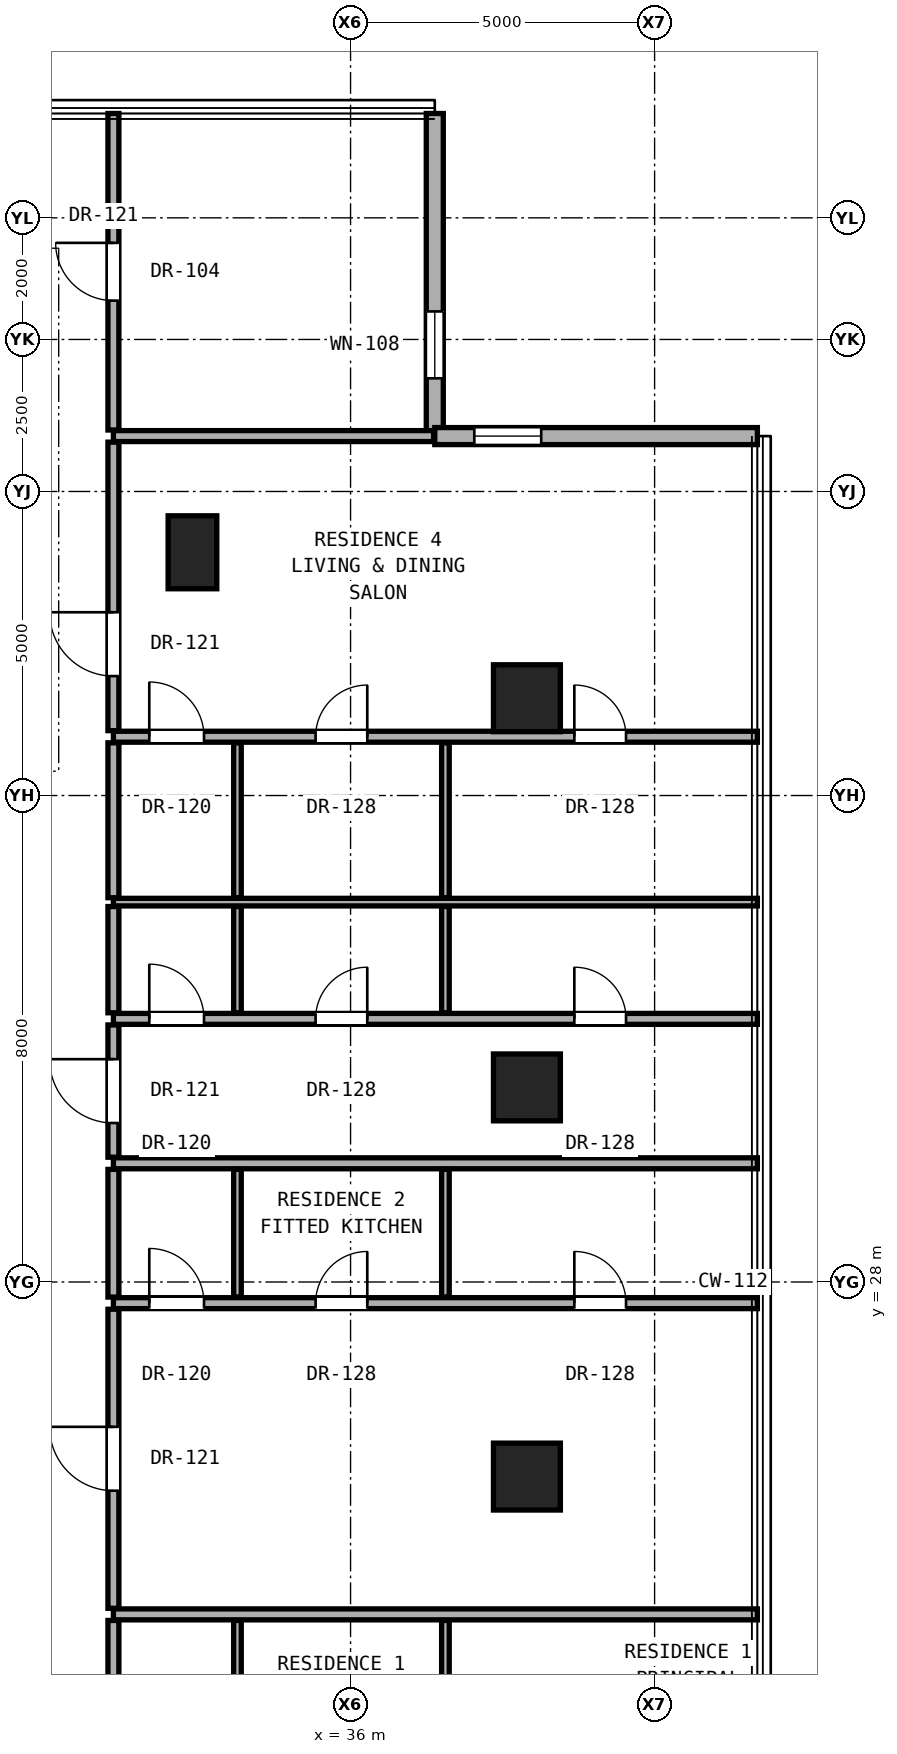
"""IFC4 building model, lengths in metres.
Left out: names, types, materials, properties, quantities, classifications, styles, units other than length and angle.
Written with IfcOpenShell. Run it as: python <this file> out.ifc"""

import sys

from ifc_helpers import new_model, si_unit, direction, frame, frame_2d, origin, origin_2d, place, context, subcontext, project, spatial, rectangle, hollow_rectangle, extrude, element, fill, save


model = new_model("IFC4")
c1 = context("Model", 3, precision=1e-05, world=origin(), true_north=direction((0.0, 1.0)))
c2 = subcontext(c1, "Body", "Model", "MODEL_VIEW")
j1 = project(units=[si_unit("LENGTHUNIT", "METRE"), si_unit("PLANEANGLEUNIT", "RADIAN")], contexts=[c1])
p1 = place(None, origin())
s1 = spatial("IfcSite", under=j1, at=p1, CompositionType="ELEMENT")
p2 = place(p1, origin())
s2 = spatial("IfcBuilding", under=s1, at=p2, CompositionType="ELEMENT")
p3 = place(p2, frame((0.0, 0.0, 111.5)))
s3 = spatial("IfcBuildingStorey", under=s2, at=p3, CompositionType="ELEMENT", Elevation=111.5)
for number, where, z_axis, x_axis in (
    (1, (38.9, 24.8, 0.0), (0.0, 0.0, 1.0), (1.0, 0.0, 0.0)),
    (2, (38.9, 31.2, 0.0), (0.0, 0.0, 1.0), (1.0, 0.0, 0.0)),
    (3, (38.9, 37.6, 0.0), (0.0, 0.0, 1.0), (1.0, 0.0, 0.0)),
):
    element("IfcColumn", number, at=place(p3, frame(where, z_axis=z_axis, x_axis=x_axis)), inside=s3, PredefinedType="COLUMN", context=c2, shape_type="SweptSolid", body=[
        extrude(hollow_rectangle(XDim=1.1, YDim=1.1, WallThickness=0.06, at=origin_2d()), origin(), (0.0, 0.0, 1.0), 3.3),
    ])
p4 = place(p3, frame((33.4, 40.0, 0.0), z_axis=(0.0, 0.0, 1.0), x_axis=(1.0, 0.0, 0.0)))
e4 = element("IfcColumn", 4, at=p4, inside=s3, PredefinedType="PILASTER", context=c2, shape_type="SweptSolid", body=[
    extrude(rectangle(XDim=0.8, YDim=1.2, at=origin_2d()), origin(), (0.0, 0.0, 1.0), 3.3),
])
p5 = place(p3, frame((37.385, 41.911, 0.0), z_axis=(0.0, 0.0, 1.0), x_axis=(0.0, 1.0, 0.0)))
e5 = element("IfcWall", 5, at=p5, inside=s3, PredefinedType="SOLIDWALL", context=c2, shape_type="SweptSolid", body=[
    extrude(rectangle(XDim=5.305, YDim=0.28, at=frame_2d((2.653, 0.0))), origin(), (0.0, 0.0, 1.0), 3.06),
])
p6 = place(p5, frame((0.95, 0.0, 0.85)))
e6 = element("IfcOpeningElement", 6, at=p6, cuts=e5, PredefinedType="OPENING", context=c2, shape_type="SweptSolid", body=[
    extrude(rectangle(XDim=1.1, YDim=2.0, at=frame_2d((0.55, 1.0))), frame((0.0, 0.15, 0.0), z_axis=(0.0, -1.0, 0.0), x_axis=(1.0, 0.0, 0.0)), (0.0, 0.0, 1.0), 0.3),
])
p7 = place(p3, frame((42.69, 41.911, 0.0), z_axis=(0.0, 0.0, 1.0), x_axis=(-1.0, 0.0, 0.0)))
e7 = element("IfcWall", 7, at=p7, inside=s3, PredefinedType="SOLIDWALL", context=c2, shape_type="SweptSolid", body=[
    extrude(rectangle(XDim=5.305, YDim=0.28, at=frame_2d((2.652, 0.0))), origin(), (0.0, 0.0, 1.0), 3.06),
])
p8 = place(p7, frame((3.555, 0.0, 0.85)))
e8 = element("IfcOpeningElement", 8, at=p8, cuts=e7, PredefinedType="OPENING", context=c2, shape_type="SweptSolid", body=[
    extrude(rectangle(XDim=1.1, YDim=2.0, at=frame_2d((0.55, 1.0))), frame((0.0, 0.15, 0.0), z_axis=(0.0, -1.0, 0.0), x_axis=(1.0, 0.0, 0.0)), (0.0, 0.0, 1.0), 0.3),
])
p9 = place(p3, frame((32.1, 22.534, 0.0), z_axis=(0.0, 0.0, 1.0), x_axis=(1.0, 0.0, 0.0)))
e9 = element("IfcWall", 9, at=p9, inside=s3, PredefinedType="PARTITIONING", context=c2, shape_type="SweptSolid", body=[
    extrude(rectangle(XDim=10.59, YDim=0.18, at=frame_2d((5.295, 0.0))), origin(), (0.0, 0.0, 1.0), 2.145),
])
p10 = place(p3, frame((32.1, 27.652, 0.0), z_axis=(0.0, 0.0, 1.0), x_axis=(1.0, 0.0, 0.0)))
e10 = element("IfcWall", 10, at=p10, inside=s3, PredefinedType="PARTITIONING", context=c2, shape_type="SweptSolid", body=[
    extrude(rectangle(XDim=10.59, YDim=0.18, at=frame_2d((5.295, 0.0))), origin(), (0.0, 0.0, 1.0), 2.145),
])
p11 = place(p10, frame((7.58, 0.0, 0.0)))
e11 = element("IfcOpeningElement", 11, at=p11, cuts=e10, PredefinedType="OPENING", context=c2, shape_type="SweptSolid", body=[
    extrude(rectangle(XDim=0.85, YDim=2.01, at=frame_2d((0.425, 1.005))), frame((0.0, 0.1, 0.0), z_axis=(0.0, -1.0, 0.0), x_axis=(1.0, 0.0, 0.0)), (0.0, 0.0, 1.0), 0.2),
])
p12 = place(p10, frame((3.325, 0.0, 0.0)))
e12 = element("IfcOpeningElement", 12, at=p12, cuts=e10, PredefinedType="OPENING", context=c2, shape_type="SweptSolid", body=[
    extrude(rectangle(XDim=0.85, YDim=2.01, at=frame_2d((0.425, 1.005))), frame((0.0, 0.1, 0.0), z_axis=(0.0, -1.0, 0.0), x_axis=(1.0, 0.0, 0.0)), (0.0, 0.0, 1.0), 0.2),
])
p13 = place(p10, frame((0.59, 0.0, 0.0)))
e13 = element("IfcOpeningElement", 13, at=p13, cuts=e10, PredefinedType="OPENING", context=c2, shape_type="SweptSolid", body=[
    extrude(rectangle(XDim=0.9, YDim=2.1, at=frame_2d((0.45, 1.05))), frame((0.0, 0.1, 0.0), z_axis=(0.0, -1.0, 0.0), x_axis=(1.0, 0.0, 0.0)), (0.0, 0.0, 1.0), 0.2),
])
p14 = place(p3, frame((32.1, 29.952, 0.0), z_axis=(0.0, 0.0, 1.0), x_axis=(1.0, 0.0, 0.0)))
e14 = element("IfcWall", 14, at=p14, inside=s3, PredefinedType="PARTITIONING", context=c2, shape_type="SweptSolid", body=[
    extrude(rectangle(XDim=10.59, YDim=0.18, at=frame_2d((5.295, 0.0))), origin(), (0.0, 0.0, 1.0), 2.145),
])
p15 = place(p3, frame((32.1, 32.327, 0.0), z_axis=(0.0, 0.0, 1.0), x_axis=(1.0, 0.0, 0.0)))
e15 = element("IfcWall", 15, at=p15, inside=s3, PredefinedType="PARTITIONING", context=c2, shape_type="SweptSolid", body=[
    extrude(rectangle(XDim=10.59, YDim=0.18, at=frame_2d((5.295, 0.0))), origin(), (0.0, 0.0, 1.0), 2.145),
])
p16 = place(p15, frame((7.58, 0.0, 0.0)))
e16 = element("IfcOpeningElement", 16, at=p16, cuts=e15, PredefinedType="OPENING", context=c2, shape_type="SweptSolid", body=[
    extrude(rectangle(XDim=0.85, YDim=2.01, at=frame_2d((0.425, 1.005))), frame((0.0, 0.1, 0.0), z_axis=(0.0, -1.0, 0.0), x_axis=(1.0, 0.0, 0.0)), (0.0, 0.0, 1.0), 0.2),
])
p17 = place(p15, frame((3.325, 0.0, 0.0)))
e17 = element("IfcOpeningElement", 17, at=p17, cuts=e15, PredefinedType="OPENING", context=c2, shape_type="SweptSolid", body=[
    extrude(rectangle(XDim=0.85, YDim=2.01, at=frame_2d((0.425, 1.005))), frame((0.0, 0.1, 0.0), z_axis=(0.0, -1.0, 0.0), x_axis=(1.0, 0.0, 0.0)), (0.0, 0.0, 1.0), 0.2),
])
p18 = place(p15, frame((0.59, 0.0, 0.0)))
e18 = element("IfcOpeningElement", 18, at=p18, cuts=e15, PredefinedType="OPENING", context=c2, shape_type="SweptSolid", body=[
    extrude(rectangle(XDim=0.9, YDim=2.1, at=frame_2d((0.45, 1.05))), frame((0.0, 0.1, 0.0), z_axis=(0.0, -1.0, 0.0), x_axis=(1.0, 0.0, 0.0)), (0.0, 0.0, 1.0), 0.2),
])
p19 = place(p3, frame((32.1, 34.247, 0.0), z_axis=(0.0, 0.0, 1.0), x_axis=(1.0, 0.0, 0.0)))
e19 = element("IfcWall", 19, at=p19, inside=s3, PredefinedType="PARTITIONING", context=c2, shape_type="SweptSolid", body=[
    extrude(rectangle(XDim=10.59, YDim=0.125, at=frame_2d((5.295, 0.0))), origin(), (0.0, 0.0, 1.0), 2.145),
])
p20 = place(p3, frame((32.1, 36.967, 0.0), z_axis=(0.0, 0.0, 1.0), x_axis=(1.0, 0.0, 0.0)))
e20 = element("IfcWall", 20, at=p20, inside=s3, PredefinedType="PARTITIONING", context=c2, shape_type="SweptSolid", body=[
    extrude(rectangle(XDim=10.59, YDim=0.18, at=frame_2d((5.295, 0.0))), origin(), (0.0, 0.0, 1.0), 2.145),
])
p21 = place(p20, frame((7.58, 0.0, 0.0)))
e21 = element("IfcOpeningElement", 21, at=p21, cuts=e20, PredefinedType="OPENING", context=c2, shape_type="SweptSolid", body=[
    extrude(rectangle(XDim=0.85, YDim=2.01, at=frame_2d((0.425, 1.005))), frame((0.0, 0.1, 0.0), z_axis=(0.0, -1.0, 0.0), x_axis=(1.0, 0.0, 0.0)), (0.0, 0.0, 1.0), 0.2),
])
p22 = place(p20, frame((3.325, 0.0, 0.0)))
e22 = element("IfcOpeningElement", 22, at=p22, cuts=e20, PredefinedType="OPENING", context=c2, shape_type="SweptSolid", body=[
    extrude(rectangle(XDim=0.85, YDim=2.01, at=frame_2d((0.425, 1.005))), frame((0.0, 0.1, 0.0), z_axis=(0.0, -1.0, 0.0), x_axis=(1.0, 0.0, 0.0)), (0.0, 0.0, 1.0), 0.2),
])
p23 = place(p20, frame((0.59, 0.0, 0.0)))
e23 = element("IfcOpeningElement", 23, at=p23, cuts=e20, PredefinedType="OPENING", context=c2, shape_type="SweptSolid", body=[
    extrude(rectangle(XDim=0.9, YDim=2.1, at=frame_2d((0.45, 1.05))), frame((0.0, 0.1, 0.0), z_axis=(0.0, -1.0, 0.0), x_axis=(1.0, 0.0, 0.0)), (0.0, 0.0, 1.0), 0.2),
])
p24 = place(p3, frame((32.1, 41.911, 0.0), z_axis=(0.0, 0.0, 1.0), x_axis=(1.0, 0.0, 0.0)))
e24 = element("IfcWall", 24, at=p24, inside=s3, PredefinedType="PARTITIONING", context=c2, shape_type="SweptSolid", body=[
    extrude(rectangle(XDim=5.265, YDim=0.18, at=frame_2d((2.632, 0.0))), origin(), (0.0, 0.0, 1.0), 3.08),
])
p25 = place(p3, frame((32.1, 19.914, 0.0), z_axis=(0.0, 0.0, 1.0), x_axis=(0.0, 1.0, 0.0)))
e25 = element("IfcWall", 25, at=p25, inside=s3, PredefinedType="PARTITIONING", context=c2, shape_type="SweptSolid", body=[
    extrude(rectangle(XDim=2.52, YDim=0.18, at=frame_2d((1.26, 0.0))), origin(), (0.0, 0.0, 1.0), 3.08),
])
p26 = place(p3, frame((32.1, 22.634, 0.0), z_axis=(0.0, 0.0, 1.0), x_axis=(0.0, 1.0, 0.0)))
e26 = element("IfcWall", 26, at=p26, inside=s3, PredefinedType="PARTITIONING", context=c2, shape_type="SweptSolid", body=[
    extrude(rectangle(XDim=4.918, YDim=0.18, at=frame_2d((2.459, 0.0))), origin(), (0.0, 0.0, 1.0), 2.299),
])
p27 = place(p26, frame((1.934, 0.0, 0.0)))
e27 = element("IfcOpeningElement", 27, at=p27, cuts=e26, PredefinedType="OPENING", context=c2, shape_type="SweptSolid", body=[
    extrude(rectangle(XDim=1.05, YDim=2.2, at=frame_2d((0.525, 1.1))), frame((0.0, 0.1, 0.0), z_axis=(0.0, -1.0, 0.0), x_axis=(1.0, 0.0, 0.0)), (0.0, 0.0, 1.0), 0.2),
])
p28 = place(p3, frame((32.1, 27.752, 0.0), z_axis=(0.0, 0.0, 1.0), x_axis=(0.0, 1.0, 0.0)))
e28 = element("IfcWall", 28, at=p28, inside=s3, PredefinedType="PARTITIONING", context=c2, shape_type="SweptSolid", body=[
    extrude(rectangle(XDim=2.1, YDim=0.18, at=frame_2d((1.05, 0.0))), origin(), (0.0, 0.0, 1.0), 3.08),
])
p29 = place(p3, frame((32.1, 30.052, 0.0), z_axis=(0.0, 0.0, 1.0), x_axis=(0.0, 1.0, 0.0)))
e29 = element("IfcWall", 29, at=p29, inside=s3, PredefinedType="PARTITIONING", context=c2, shape_type="SweptSolid", body=[
    extrude(rectangle(XDim=2.175, YDim=0.18, at=frame_2d((1.087, 0.0))), origin(), (0.0, 0.0, 1.0), 2.299),
])
p30 = place(p29, frame((0.562, 0.0, 0.0)))
e30 = element("IfcOpeningElement", 30, at=p30, cuts=e29, PredefinedType="OPENING", context=c2, shape_type="SweptSolid", body=[
    extrude(rectangle(XDim=1.05, YDim=2.2, at=frame_2d((0.525, 1.1))), frame((0.0, 0.1, 0.0), z_axis=(0.0, -1.0, 0.0), x_axis=(1.0, 0.0, 0.0)), (0.0, 0.0, 1.0), 0.2),
])
p31 = place(p3, frame((32.1, 32.427, 0.0), z_axis=(0.0, 0.0, 1.0), x_axis=(0.0, 1.0, 0.0)))
e31 = element("IfcWall", 31, at=p31, inside=s3, PredefinedType="PARTITIONING", context=c2, shape_type="SweptSolid", body=[
    extrude(rectangle(XDim=1.748, YDim=0.18, at=frame_2d((0.874, 0.0))), origin(), (0.0, 0.0, 1.0), 3.08),
])
p32 = place(p3, frame((32.1, 34.32, 0.0), z_axis=(0.0, 0.0, 1.0), x_axis=(0.0, 1.0, 0.0)))
e32 = element("IfcWall", 32, at=p32, inside=s3, PredefinedType="PARTITIONING", context=c2, shape_type="SweptSolid", body=[
    extrude(rectangle(XDim=2.547, YDim=0.18, at=frame_2d((1.274, 0.0))), origin(), (0.0, 0.0, 1.0), 3.08),
])
p33 = place(p3, frame((32.1, 37.067, 0.0), z_axis=(0.0, 0.0, 1.0), x_axis=(0.0, 1.0, 0.0)))
e33 = element("IfcWall", 33, at=p33, inside=s3, PredefinedType="PARTITIONING", context=c2, shape_type="SweptSolid", body=[
    extrude(rectangle(XDim=4.744, YDim=0.18, at=frame_2d((2.372, 0.0))), origin(), (0.0, 0.0, 1.0), 2.456),
])
p34 = place(p33, frame((0.897, 0.0, 0.0)))
e34 = element("IfcOpeningElement", 34, at=p34, cuts=e33, PredefinedType="OPENING", context=c2, shape_type="SweptSolid", body=[
    extrude(rectangle(XDim=1.05, YDim=2.2, at=frame_2d((0.525, 1.1))), frame((0.0, 0.1, 0.0), z_axis=(0.0, -1.0, 0.0), x_axis=(1.0, 0.0, 0.0)), (0.0, 0.0, 1.0), 0.2),
])
p35 = place(p3, frame((32.1, 42.011, 0.0), z_axis=(0.0, 0.0, 1.0), x_axis=(0.0, 1.0, 0.0)))
e35 = element("IfcWall", 35, at=p35, inside=s3, PredefinedType="PARTITIONING", context=c2, shape_type="SweptSolid", body=[
    extrude(rectangle(XDim=5.205, YDim=0.18, at=frame_2d((2.603, 0.0))), origin(), (0.0, 0.0, 1.0), 3.08),
])
p36 = place(p35, frame((2.127, 0.0, 0.0)))
e36 = element("IfcOpeningElement", 36, at=p36, cuts=e35, PredefinedType="OPENING", context=c2, shape_type="SweptSolid", body=[
    extrude(rectangle(XDim=0.95, YDim=2.15, at=frame_2d((0.475, 1.075))), frame((0.0, 0.1, 0.0), z_axis=(0.0, -1.0, 0.0), x_axis=(1.0, 0.0, 0.0)), (0.0, 0.0, 1.0), 0.2),
])
p37 = place(p3, frame((34.14, 19.914, 0.0), z_axis=(0.0, 0.0, 1.0), x_axis=(0.0, 1.0, 0.0)))
e37 = element("IfcWall", 37, at=p37, inside=s3, PredefinedType="PARTITIONING", context=c2, shape_type="SweptSolid", body=[
    extrude(rectangle(XDim=2.52, YDim=0.125, at=frame_2d((1.26, 0.0))), origin(), (0.0, 0.0, 1.0), 3.08),
])
p38 = place(p3, frame((34.14, 27.752, 0.0), z_axis=(0.0, 0.0, 1.0), x_axis=(0.0, 1.0, 0.0)))
e38 = element("IfcWall", 38, at=p38, inside=s3, PredefinedType="PARTITIONING", context=c2, shape_type="SweptSolid", body=[
    extrude(rectangle(XDim=2.1, YDim=0.125, at=frame_2d((1.05, 0.0))), origin(), (0.0, 0.0, 1.0), 3.08),
])
p39 = place(p3, frame((34.14, 32.427, 0.0), z_axis=(0.0, 0.0, 1.0), x_axis=(0.0, 1.0, 0.0)))
e39 = element("IfcWall", 39, at=p39, inside=s3, PredefinedType="PARTITIONING", context=c2, shape_type="SweptSolid", body=[
    extrude(rectangle(XDim=1.748, YDim=0.125, at=frame_2d((0.874, 0.0))), origin(), (0.0, 0.0, 1.0), 3.08),
])
p40 = place(p3, frame((34.14, 34.32, 0.0), z_axis=(0.0, 0.0, 1.0), x_axis=(0.0, 1.0, 0.0)))
e40 = element("IfcWall", 40, at=p40, inside=s3, PredefinedType="PARTITIONING", context=c2, shape_type="SweptSolid", body=[
    extrude(rectangle(XDim=2.547, YDim=0.125, at=frame_2d((1.274, 0.0))), origin(), (0.0, 0.0, 1.0), 3.08),
])
p41 = place(p3, frame((37.56, 19.914, 0.0), z_axis=(0.0, 0.0, 1.0), x_axis=(0.0, 1.0, 0.0)))
e41 = element("IfcWall", 41, at=p41, inside=s3, PredefinedType="PARTITIONING", context=c2, shape_type="SweptSolid", body=[
    extrude(rectangle(XDim=2.52, YDim=0.125, at=frame_2d((1.26, 0.0))), origin(), (0.0, 0.0, 1.0), 3.08),
])
p42 = place(p3, frame((37.56, 27.752, 0.0), z_axis=(0.0, 0.0, 1.0), x_axis=(0.0, 1.0, 0.0)))
e42 = element("IfcWall", 42, at=p42, inside=s3, PredefinedType="PARTITIONING", context=c2, shape_type="SweptSolid", body=[
    extrude(rectangle(XDim=2.1, YDim=0.125, at=frame_2d((1.05, 0.0))), origin(), (0.0, 0.0, 1.0), 3.08),
])
p43 = place(p3, frame((37.56, 32.427, 0.0), z_axis=(0.0, 0.0, 1.0), x_axis=(0.0, 1.0, 0.0)))
e43 = element("IfcWall", 43, at=p43, inside=s3, PredefinedType="PARTITIONING", context=c2, shape_type="SweptSolid", body=[
    extrude(rectangle(XDim=1.748, YDim=0.125, at=frame_2d((0.874, 0.0))), origin(), (0.0, 0.0, 1.0), 3.08),
])
p44 = place(p3, frame((37.56, 34.32, 0.0), z_axis=(0.0, 0.0, 1.0), x_axis=(0.0, 1.0, 0.0)))
e44 = element("IfcWall", 44, at=p44, inside=s3, PredefinedType="PARTITIONING", context=c2, shape_type="SweptSolid", body=[
    extrude(rectangle(XDim=2.547, YDim=0.125, at=frame_2d((1.274, 0.0))), origin(), (0.0, 0.0, 1.0), 3.08),
])
p45 = place(p6, origin())
e45 = element("IfcWindow", 45, at=p45, inside=s3, PartitioningType="SINGLE_PANEL", PredefinedType="WINDOW", context=c2, shape_type="SweptSolid", body=[
    extrude(rectangle(XDim=1.1, YDim=2.0, at=frame_2d((0.55, 1.0))), frame((0.0, 0.03, 0.0), z_axis=(0.0, -1.0, 0.0), x_axis=(1.0, 0.0, 0.0)), (0.0, 0.0, 1.0), 0.06),
])
fill(e6, e45)
p46 = place(p8, origin())
e46 = element("IfcWindow", 46, at=p46, inside=s3, PartitioningType="SINGLE_PANEL", PredefinedType="WINDOW", context=c2, shape_type="SweptSolid", body=[
    extrude(rectangle(XDim=1.1, YDim=2.0, at=frame_2d((0.55, 1.0))), frame((0.0, 0.03, 0.0), z_axis=(0.0, -1.0, 0.0), x_axis=(1.0, 0.0, 0.0)), (0.0, 0.0, 1.0), 0.06),
])
fill(e8, e46)
p47 = place(p27, origin())
e47 = element("IfcDoor", 47, at=p47, inside=s3, OperationType="SINGLE_SWING_RIGHT", PredefinedType="DOOR", context=c2, shape_type="SweptSolid", body=[
    extrude(rectangle(XDim=1.05, YDim=2.2, at=frame_2d((0.525, 1.1))), frame((0.0, 0.025, 0.0), z_axis=(0.0, -1.0, 0.0), x_axis=(1.0, 0.0, 0.0)), (0.0, 0.0, 1.0), 0.05),
])
fill(e27, e47)
p48 = place(p11, origin())
e48 = element("IfcDoor", 48, at=p48, inside=s3, OperationType="SINGLE_SWING_LEFT", PredefinedType="DOOR", context=c2, shape_type="SweptSolid", body=[
    extrude(rectangle(XDim=0.85, YDim=2.01, at=frame_2d((0.425, 1.005))), frame((0.0, 0.025, 0.0), z_axis=(0.0, -1.0, 0.0), x_axis=(1.0, 0.0, 0.0)), (0.0, 0.0, 1.0), 0.05),
])
fill(e11, e48)
p49 = place(p12, origin())
e49 = element("IfcDoor", 49, at=p49, inside=s3, OperationType="SINGLE_SWING_RIGHT", PredefinedType="DOOR", context=c2, shape_type="SweptSolid", body=[
    extrude(rectangle(XDim=0.85, YDim=2.01, at=frame_2d((0.425, 1.005))), frame((0.0, 0.025, 0.0), z_axis=(0.0, -1.0, 0.0), x_axis=(1.0, 0.0, 0.0)), (0.0, 0.0, 1.0), 0.05),
])
fill(e12, e49)
p50 = place(p13, origin())
e50 = element("IfcDoor", 50, at=p50, inside=s3, OperationType="SINGLE_SWING_LEFT", PredefinedType="DOOR", context=c2, shape_type="SweptSolid", body=[
    extrude(rectangle(XDim=0.9, YDim=2.1, at=frame_2d((0.45, 1.05))), frame((0.0, 0.025, 0.0), z_axis=(0.0, -1.0, 0.0), x_axis=(1.0, 0.0, 0.0)), (0.0, 0.0, 1.0), 0.05),
])
fill(e13, e50)
p51 = place(p30, origin())
e51 = element("IfcDoor", 51, at=p51, inside=s3, OperationType="SINGLE_SWING_RIGHT", PredefinedType="DOOR", context=c2, shape_type="SweptSolid", body=[
    extrude(rectangle(XDim=1.05, YDim=2.2, at=frame_2d((0.525, 1.1))), frame((0.0, 0.025, 0.0), z_axis=(0.0, -1.0, 0.0), x_axis=(1.0, 0.0, 0.0)), (0.0, 0.0, 1.0), 0.05),
])
fill(e30, e51)
p52 = place(p16, origin())
e52 = element("IfcDoor", 52, at=p52, inside=s3, OperationType="SINGLE_SWING_LEFT", PredefinedType="DOOR", context=c2, shape_type="SweptSolid", body=[
    extrude(rectangle(XDim=0.85, YDim=2.01, at=frame_2d((0.425, 1.005))), frame((0.0, 0.025, 0.0), z_axis=(0.0, -1.0, 0.0), x_axis=(1.0, 0.0, 0.0)), (0.0, 0.0, 1.0), 0.05),
])
fill(e16, e52)
p53 = place(p17, origin())
e53 = element("IfcDoor", 53, at=p53, inside=s3, OperationType="SINGLE_SWING_RIGHT", PredefinedType="DOOR", context=c2, shape_type="SweptSolid", body=[
    extrude(rectangle(XDim=0.85, YDim=2.01, at=frame_2d((0.425, 1.005))), frame((0.0, 0.025, 0.0), z_axis=(0.0, -1.0, 0.0), x_axis=(1.0, 0.0, 0.0)), (0.0, 0.0, 1.0), 0.05),
])
fill(e17, e53)
p54 = place(p18, origin())
e54 = element("IfcDoor", 54, at=p54, inside=s3, OperationType="SINGLE_SWING_LEFT", PredefinedType="DOOR", context=c2, shape_type="SweptSolid", body=[
    extrude(rectangle(XDim=0.9, YDim=2.1, at=frame_2d((0.45, 1.05))), frame((0.0, 0.025, 0.0), z_axis=(0.0, -1.0, 0.0), x_axis=(1.0, 0.0, 0.0)), (0.0, 0.0, 1.0), 0.05),
])
fill(e18, e54)
p55 = place(p34, origin())
e55 = element("IfcDoor", 55, at=p55, inside=s3, OperationType="SINGLE_SWING_RIGHT", PredefinedType="DOOR", context=c2, shape_type="SweptSolid", body=[
    extrude(rectangle(XDim=1.05, YDim=2.2, at=frame_2d((0.525, 1.1))), frame((0.0, 0.025, 0.0), z_axis=(0.0, -1.0, 0.0), x_axis=(1.0, 0.0, 0.0)), (0.0, 0.0, 1.0), 0.05),
])
fill(e34, e55)
p56 = place(p21, origin())
e56 = element("IfcDoor", 56, at=p56, inside=s3, OperationType="SINGLE_SWING_LEFT", PredefinedType="DOOR", context=c2, shape_type="SweptSolid", body=[
    extrude(rectangle(XDim=0.85, YDim=2.01, at=frame_2d((0.425, 1.005))), frame((0.0, 0.025, 0.0), z_axis=(0.0, -1.0, 0.0), x_axis=(1.0, 0.0, 0.0)), (0.0, 0.0, 1.0), 0.05),
])
fill(e21, e56)
p57 = place(p22, origin())
e57 = element("IfcDoor", 57, at=p57, inside=s3, OperationType="SINGLE_SWING_RIGHT", PredefinedType="DOOR", context=c2, shape_type="SweptSolid", body=[
    extrude(rectangle(XDim=0.85, YDim=2.01, at=frame_2d((0.425, 1.005))), frame((0.0, 0.025, 0.0), z_axis=(0.0, -1.0, 0.0), x_axis=(1.0, 0.0, 0.0)), (0.0, 0.0, 1.0), 0.05),
])
fill(e22, e57)
p58 = place(p23, origin())
e58 = element("IfcDoor", 58, at=p58, inside=s3, OperationType="SINGLE_SWING_LEFT", PredefinedType="DOOR", context=c2, shape_type="SweptSolid", body=[
    extrude(rectangle(XDim=0.9, YDim=2.1, at=frame_2d((0.45, 1.05))), frame((0.0, 0.025, 0.0), z_axis=(0.0, -1.0, 0.0), x_axis=(1.0, 0.0, 0.0)), (0.0, 0.0, 1.0), 0.05),
])
fill(e23, e58)
p59 = place(p36, origin())
e59 = element("IfcDoor", 59, at=p59, inside=s3, OperationType="SINGLE_SWING_RIGHT", PredefinedType="DOOR", context=c2, shape_type="SweptSolid", body=[
    extrude(rectangle(XDim=0.95, YDim=2.15, at=frame_2d((0.475, 1.075))), frame((0.0, 0.025, 0.0), z_axis=(0.0, -1.0, 0.0), x_axis=(1.0, 0.0, 0.0)), (0.0, 0.0, 1.0), 0.05),
])
fill(e36, e59)
save(model, sys.argv[1])
